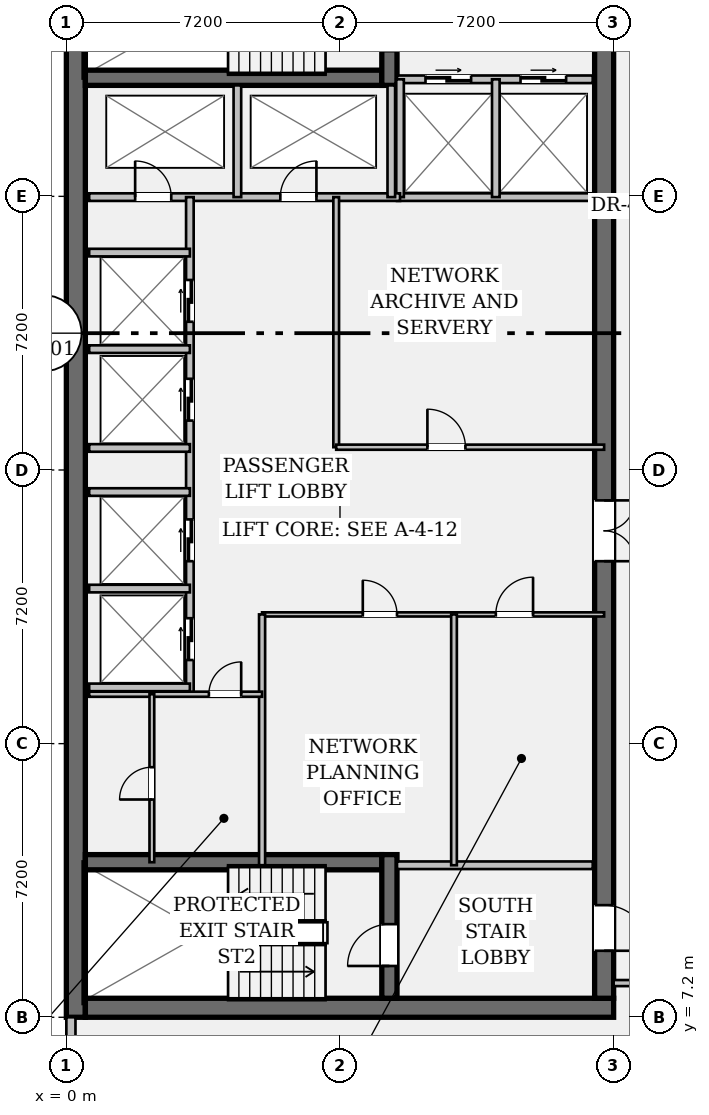
"""IFC4 building model, lengths in metres.
Left out: names, types, materials, properties, quantities, classifications, styles, units other than length and angle.
Written with IfcOpenShell. Run it as: python <this file> out.ifc"""

import sys

from ifc_helpers import new_model, si_unit, direction, frame, frame_2d, origin, place, context, subcontext, project, spatial, rectangle, extrude, element, fill, save


model = new_model("IFC4")
c1 = context("Model", 3, precision=1e-05, world=origin(), true_north=direction((0.0, 1.0)))
c2 = subcontext(c1, "Body", "Model", "MODEL_VIEW")
j1 = project(units=[si_unit("LENGTHUNIT", "METRE"), si_unit("PLANEANGLEUNIT", "RADIAN")], contexts=[c1])
p1 = place(None, origin())
s1 = spatial("IfcSite", under=j1, at=p1, CompositionType="ELEMENT")
p2 = place(p1, origin())
s2 = spatial("IfcBuilding", under=s1, at=p2, CompositionType="ELEMENT")
p3 = place(p2, frame((0.0, 0.0, 176.75)))
s3 = spatial("IfcBuildingStorey", under=s2, at=p3, CompositionType="ELEMENT", Elevation=176.75)
p4 = place(p3, frame((0.25, 7.2, 0.0), z_axis=(0.0, 0.0, 1.0), x_axis=(0.0, 1.0, 0.0)))
e1 = element("IfcWall", 1, at=p4, inside=s3, PredefinedType="SHEAR", context=c2, shape_type="SweptSolid", body=[
    extrude(rectangle(XDim=28.8, YDim=0.5, at=frame_2d((14.4, 0.0))), origin(), (0.0, 0.0, 1.0), 3.24),
])
p5 = place(p3, frame((0.5, 7.45, 0.0), z_axis=(0.0, 0.0, 1.0), x_axis=(1.0, 0.0, 0.0)))
e2 = element("IfcWall", 2, at=p5, inside=s3, PredefinedType="SHEAR", context=c2, shape_type="SweptSolid", body=[
    extrude(rectangle(XDim=13.9, YDim=0.5, at=frame_2d((6.95, 0.0))), origin(), (0.0, 0.0, 1.0), 3.24),
])
p6 = place(p3, frame((14.15, 35.5, 0.0), z_axis=(0.0, 0.0, 1.0), x_axis=(0.0, -1.0, 0.0)))
e3 = element("IfcWall", 3, at=p6, inside=s3, PredefinedType="SHEAR", context=c2, shape_type="SweptSolid", body=[
    extrude(rectangle(XDim=27.8, YDim=0.5, at=frame_2d((13.9, 0.0))), origin(), (0.0, 0.0, 1.0), 3.24),
])
p7 = place(p6, frame((1.4, 0.0, 0.0)))
e4 = element("IfcOpeningElement", 4, at=p7, cuts=e3, PredefinedType="OPENING", context=c2, shape_type="SweptSolid", body=[
    extrude(rectangle(XDim=1.2, YDim=2.15, at=frame_2d((0.6, 1.075))), frame((0.0, 0.262, 0.0), z_axis=(0.0, -1.0, 0.0), x_axis=(1.0, 0.0, 0.0)), (0.0, 0.0, 1.0), 0.524),
])
p8 = place(p6, frame((25.35, 0.0, 0.0)))
e5 = element("IfcOpeningElement", 5, at=p8, cuts=e3, PredefinedType="OPENING", context=c2, shape_type="SweptSolid", body=[
    extrude(rectangle(XDim=1.2, YDim=2.15, at=frame_2d((0.6, 1.075))), frame((0.0, 0.262, 0.0), z_axis=(0.0, -1.0, 0.0), x_axis=(1.0, 0.0, 0.0)), (0.0, 0.0, 1.0), 0.524),
])
p9 = place(p6, frame((14.7, 0.0, 0.0)))
e6 = element("IfcOpeningElement", 6, at=p9, cuts=e3, PredefinedType="OPENING", context=c2, shape_type="SweptSolid", body=[
    extrude(rectangle(XDim=1.6, YDim=2.2, at=frame_2d((0.8, 1.1))), frame((0.0, 0.262, 0.0), z_axis=(0.0, -1.0, 0.0), x_axis=(1.0, 0.0, 0.0)), (0.0, 0.0, 1.0), 0.524),
])
for number, where, z_axis, x_axis in (
    (7, (0.5, 31.92, 0.0), (0.0, 0.0, 1.0), (1.0, 0.0, 0.0)),
    (8, (0.5, 11.28, 0.0), (0.0, 0.0, 1.0), (1.0, 0.0, 0.0)),
):
    element("IfcWall", number, at=place(p3, frame(where, z_axis=z_axis, x_axis=x_axis)), inside=s3, PredefinedType="SHEAR", context=c2, shape_type="SweptSolid", body=[
        extrude(rectangle(XDim=7.8, YDim=0.4, at=frame_2d((3.9, 0.0))), origin(), (0.0, 0.0, 1.0), 3.24),
    ])
p10 = place(p3, frame((8.5, 31.72, 0.0), z_axis=(0.0, 0.0, 1.0), x_axis=(0.0, 1.0, 0.0)))
e9 = element("IfcWall", 9, at=p10, inside=s3, PredefinedType="SHEAR", context=c2, shape_type="SweptSolid", body=[
    extrude(rectangle(XDim=3.78, YDim=0.4, at=frame_2d((1.89, 0.0))), origin(), (0.0, 0.0, 1.0), 3.24),
])
p11 = place(p10, frame((0.9, 0.0, 0.0)))
e10 = element("IfcOpeningElement", 10, at=p11, cuts=e9, PredefinedType="OPENING", context=c2, shape_type="SweptSolid", body=[
    extrude(rectangle(XDim=1.1, YDim=2.15, at=frame_2d((0.55, 1.075))), frame((0.0, 0.212, 0.0), z_axis=(0.0, -1.0, 0.0), x_axis=(1.0, 0.0, 0.0)), (0.0, 0.0, 1.0), 0.424),
])
p12 = place(p3, frame((8.5, 7.7, 0.0), z_axis=(0.0, 0.0, 1.0), x_axis=(0.0, 1.0, 0.0)))
e11 = element("IfcWall", 11, at=p12, inside=s3, PredefinedType="SHEAR", context=c2, shape_type="SweptSolid", body=[
    extrude(rectangle(XDim=3.78, YDim=0.4, at=frame_2d((1.89, 0.0))), origin(), (0.0, 0.0, 1.0), 3.24),
])
p13 = place(p12, frame((0.85, 0.0, 0.0)))
e12 = element("IfcOpeningElement", 12, at=p13, cuts=e11, PredefinedType="OPENING", context=c2, shape_type="SweptSolid", body=[
    extrude(rectangle(XDim=1.1, YDim=2.15, at=frame_2d((0.55, 1.075))), frame((0.0, 0.212, 0.0), z_axis=(0.0, -1.0, 0.0), x_axis=(1.0, 0.0, 0.0)), (0.0, 0.0, 1.0), 0.424),
])
p14 = place(p3, frame((0.12, 6.07, 0.0), z_axis=(0.0, 0.0, 1.0), x_axis=(0.0, 1.0, 0.0)))
e13 = element("IfcWall", 13, at=p14, inside=s3, PredefinedType="STANDARD", context=c2, shape_type="SweptSolid", body=[
    extrude(rectangle(XDim=1.13, YDim=0.24, at=frame_2d((0.565, 0.0))), origin(), (0.0, 0.0, 1.0), 3.24),
])
p15 = place(p3, frame((8.7, 31.88, 0.0), z_axis=(0.0, 0.0, 1.0), x_axis=(1.0, 0.0, 0.0)))
e14 = element("IfcWall", 14, at=p15, inside=s3, PredefinedType="PARTITIONING", context=c2, shape_type="SweptSolid", body=[
    extrude(rectangle(XDim=5.15, YDim=0.2, at=frame_2d((2.575, 0.0))), origin(), (0.0, 0.0, 1.0), 3.24),
])
p16 = place(p15, frame((0.75, 0.0, 0.0)))
e15 = element("IfcOpeningElement", 15, at=p16, cuts=e14, PredefinedType="OPENING", context=c2, shape_type="SweptSolid", body=[
    extrude(rectangle(XDim=1.2, YDim=2.2, at=frame_2d((0.6, 1.1))), frame((0.0, 0.112, 0.0), z_axis=(0.0, -1.0, 0.0), x_axis=(1.0, 0.0, 0.0)), (0.0, 0.0, 1.0), 0.224),
])
p17 = place(p15, frame((3.25, 0.0, 0.0)))
e16 = element("IfcOpeningElement", 16, at=p17, cuts=e14, PredefinedType="OPENING", context=c2, shape_type="SweptSolid", body=[
    extrude(rectangle(XDim=1.2, YDim=2.2, at=frame_2d((0.6, 1.1))), frame((0.0, 0.112, 0.0), z_axis=(0.0, -1.0, 0.0), x_axis=(1.0, 0.0, 0.0)), (0.0, 0.0, 1.0), 0.224),
])
for number, where, z_axis, x_axis in (
    (17, (8.7, 11.2, 0.0), (0.0, 0.0, 1.0), (1.0, 0.0, 0.0)),
    (18, (8.7, 28.78, 0.0), (0.0, 0.0, 1.0), (1.0, 0.0, 0.0)),
):
    element("IfcWall", number, at=place(p3, frame(where, z_axis=z_axis, x_axis=x_axis)), inside=s3, PredefinedType="PARTITIONING", context=c2, shape_type="SweptSolid", body=[
        extrude(rectangle(XDim=5.15, YDim=0.2, at=frame_2d((2.575, 0.0))), origin(), (0.0, 0.0, 1.0), 3.24),
    ])
for number, where, z_axis, x_axis in (
    (19, (8.78, 28.78, 0.0), (0.0, 0.0, 1.0), (0.0, 1.0, 0.0)),
    (20, (11.3, 28.78, 0.0), (0.0, 0.0, 1.0), (0.0, 1.0, 0.0)),
):
    element("IfcWall", number, at=place(p3, frame(where, z_axis=z_axis, x_axis=x_axis)), inside=s3, PredefinedType="PARTITIONING", context=c2, shape_type="SweptSolid", body=[
        extrude(rectangle(XDim=3.1, YDim=0.2, at=frame_2d((1.55, 0.0))), origin(), (0.0, 0.0, 1.0), 3.24),
    ])
p18 = place(p3, frame((0.6, 28.78, 0.0), z_axis=(0.0, 0.0, 1.0), x_axis=(1.0, 0.0, 0.0)))
e21 = element("IfcWall", 21, at=p18, inside=s3, PredefinedType="PARTITIONING", context=c2, shape_type="SweptSolid", body=[
    extrude(rectangle(XDim=8.18, YDim=0.2, at=frame_2d((4.09, 0.0))), origin(), (0.0, 0.0, 1.0), 3.24),
])
p19 = place(p18, frame((1.21, 0.0, 0.0)))
e22 = element("IfcOpeningElement", 22, at=p19, cuts=e21, PredefinedType="OPENING", context=c2, shape_type="SweptSolid", body=[
    extrude(rectangle(XDim=0.95, YDim=2.15, at=frame_2d((0.475, 1.075))), frame((0.0, 0.112, 0.0), z_axis=(0.0, -1.0, 0.0), x_axis=(1.0, 0.0, 0.0)), (0.0, 0.0, 1.0), 0.224),
])
p20 = place(p18, frame((5.03, 0.0, 0.0)))
e23 = element("IfcOpeningElement", 23, at=p20, cuts=e21, PredefinedType="OPENING", context=c2, shape_type="SweptSolid", body=[
    extrude(rectangle(XDim=0.95, YDim=2.15, at=frame_2d((0.475, 1.075))), frame((0.0, 0.112, 0.0), z_axis=(0.0, -1.0, 0.0), x_axis=(1.0, 0.0, 0.0)), (0.0, 0.0, 1.0), 0.224),
])
for number, where, z_axis, x_axis in (
    (24, (4.5, 28.78, 0.0), (0.0, 0.0, 1.0), (0.0, 1.0, 0.0)),
    (25, (8.55, 28.78, 0.0), (0.0, 0.0, 1.0), (0.0, 1.0, 0.0)),
):
    element("IfcWall", number, at=place(p3, frame(where, z_axis=z_axis, x_axis=x_axis)), inside=s3, PredefinedType="PARTITIONING", context=c2, shape_type="SweptSolid", body=[
        extrude(rectangle(XDim=2.94, YDim=0.2, at=frame_2d((1.47, 0.0))), origin(), (0.0, 0.0, 1.0), 3.24),
    ])
p21 = place(p3, frame((3.25, 15.7, 0.0), z_axis=(0.0, 0.0, 1.0), x_axis=(0.0, 1.0, 0.0)))
e26 = element("IfcWall", 26, at=p21, inside=s3, PredefinedType="PARTITIONING", context=c2, shape_type="SweptSolid", body=[
    extrude(rectangle(XDim=13.08, YDim=0.2, at=frame_2d((6.54, 0.0))), origin(), (0.0, 0.0, 1.0), 3.24),
])
p22 = place(p21, frame((0.9, 0.0, 0.0)))
e27 = element("IfcOpeningElement", 27, at=p22, cuts=e26, PredefinedType="OPENING", context=c2, shape_type="SweptSolid", body=[
    extrude(rectangle(XDim=1.1, YDim=2.2, at=frame_2d((0.55, 1.1))), frame((0.0, 0.112, 0.0), z_axis=(0.0, -1.0, 0.0), x_axis=(1.0, 0.0, 0.0)), (0.0, 0.0, 1.0), 0.224),
])
p23 = place(p21, frame((3.5, 0.0, 0.0)))
e28 = element("IfcOpeningElement", 28, at=p23, cuts=e26, PredefinedType="OPENING", context=c2, shape_type="SweptSolid", body=[
    extrude(rectangle(XDim=1.1, YDim=2.2, at=frame_2d((0.55, 1.1))), frame((0.0, 0.112, 0.0), z_axis=(0.0, -1.0, 0.0), x_axis=(1.0, 0.0, 0.0)), (0.0, 0.0, 1.0), 0.224),
])
p24 = place(p21, frame((7.2, 0.0, 0.0)))
e29 = element("IfcOpeningElement", 29, at=p24, cuts=e26, PredefinedType="OPENING", context=c2, shape_type="SweptSolid", body=[
    extrude(rectangle(XDim=1.1, YDim=2.2, at=frame_2d((0.55, 1.1))), frame((0.0, 0.112, 0.0), z_axis=(0.0, -1.0, 0.0), x_axis=(1.0, 0.0, 0.0)), (0.0, 0.0, 1.0), 0.224),
])
p25 = place(p21, frame((9.8, 0.0, 0.0)))
e30 = element("IfcOpeningElement", 30, at=p25, cuts=e26, PredefinedType="OPENING", context=c2, shape_type="SweptSolid", body=[
    extrude(rectangle(XDim=1.1, YDim=2.2, at=frame_2d((0.55, 1.1))), frame((0.0, 0.112, 0.0), z_axis=(0.0, -1.0, 0.0), x_axis=(1.0, 0.0, 0.0)), (0.0, 0.0, 1.0), 0.224),
])
for number, where, z_axis, x_axis in (
    (31, (0.6, 15.88, 0.0), (0.0, 0.0, 1.0), (1.0, 0.0, 0.0)),
    (32, (0.6, 18.48, 0.0), (0.0, 0.0, 1.0), (1.0, 0.0, 0.0)),
    (33, (0.6, 22.18, 0.0), (0.0, 0.0, 1.0), (1.0, 0.0, 0.0)),
    (34, (0.6, 24.78, 0.0), (0.0, 0.0, 1.0), (1.0, 0.0, 0.0)),
    (35, (0.6, 21.02, 0.0), (0.0, 0.0, 1.0), (1.0, 0.0, 0.0)),
    (36, (0.6, 27.32, 0.0), (0.0, 0.0, 1.0), (1.0, 0.0, 0.0)),
):
    element("IfcWall", number, at=place(p3, frame(where, z_axis=z_axis, x_axis=x_axis)), inside=s3, PredefinedType="PARTITIONING", context=c2, shape_type="SweptSolid", body=[
        extrude(rectangle(XDim=2.65, YDim=0.2, at=frame_2d((1.325, 0.0))), origin(), (0.0, 0.0, 1.0), 3.24),
    ])
p26 = place(p3, frame((7.1, 22.2, 0.0), z_axis=(0.0, 0.0, 1.0), x_axis=(0.0, 1.0, 0.0)))
e37 = element("IfcWall", 37, at=p26, inside=s3, PredefinedType="PARTITIONING", context=c2, shape_type="SweptSolid", body=[
    extrude(rectangle(XDim=6.58, YDim=0.15, at=frame_2d((3.29, 0.0))), origin(), (0.0, 0.0, 1.0), 3.24),
])
p27 = place(p3, frame((7.1, 22.2, 0.0), z_axis=(0.0, 0.0, 1.0), x_axis=(1.0, 0.0, 0.0)))
e38 = element("IfcWall", 38, at=p27, inside=s3, PredefinedType="PARTITIONING", context=c2, shape_type="SweptSolid", body=[
    extrude(rectangle(XDim=7.05, YDim=0.135, at=frame_2d((3.525, 0.0))), origin(), (0.0, 0.0, 1.0), 3.24),
])
p28 = place(p27, frame((2.4, 0.0, 0.0)))
e39 = element("IfcOpeningElement", 39, at=p28, cuts=e38, PredefinedType="OPENING", context=c2, shape_type="SweptSolid", body=[
    extrude(rectangle(XDim=1.0, YDim=2.15, at=frame_2d((0.5, 1.075))), frame((0.0, 0.08, 0.0), z_axis=(0.0, -1.0, 0.0), x_axis=(1.0, 0.0, 0.0)), (0.0, 0.0, 1.0), 0.159),
])
p29 = place(p3, frame((5.15, 17.8, 0.0), z_axis=(0.0, 0.0, 1.0), x_axis=(1.0, 0.0, 0.0)))
e40 = element("IfcWall", 40, at=p29, inside=s3, PredefinedType="PARTITIONING", context=c2, shape_type="SweptSolid", body=[
    extrude(rectangle(XDim=9.0, YDim=0.11, at=frame_2d((4.5, 0.0))), origin(), (0.0, 0.0, 1.0), 3.24),
])
p30 = place(p29, frame((2.65, 0.0, 0.0)))
e41 = element("IfcOpeningElement", 41, at=p30, cuts=e40, PredefinedType="OPENING", context=c2, shape_type="SweptSolid", body=[
    extrude(rectangle(XDim=0.9, YDim=2.15, at=frame_2d((0.45, 1.075))), frame((0.0, 0.067, 0.0), z_axis=(0.0, -1.0, 0.0), x_axis=(1.0, 0.0, 0.0)), (0.0, 0.0, 1.0), 0.134),
])
p31 = place(p29, frame((6.15, 0.0, 0.0)))
e42 = element("IfcOpeningElement", 42, at=p31, cuts=e40, PredefinedType="OPENING", context=c2, shape_type="SweptSolid", body=[
    extrude(rectangle(XDim=0.98, YDim=2.15, at=frame_2d((0.49, 1.075))), frame((0.0, 0.067, 0.0), z_axis=(0.0, -1.0, 0.0), x_axis=(1.0, 0.0, 0.0)), (0.0, 0.0, 1.0), 0.134),
])
p32 = place(p3, frame((5.15, 11.2, 0.0), z_axis=(0.0, 0.0, 1.0), x_axis=(0.0, 1.0, 0.0)))
e43 = element("IfcWall", 43, at=p32, inside=s3, PredefinedType="PARTITIONING", context=c2, shape_type="SweptSolid", body=[
    extrude(rectangle(XDim=6.6, YDim=0.16, at=frame_2d((3.3, 0.0))), origin(), (0.0, 0.0, 1.0), 3.24),
])
p33 = place(p3, frame((10.2, 11.2, 0.0), z_axis=(0.0, 0.0, 1.0), x_axis=(0.0, 1.0, 0.0)))
e44 = element("IfcWall", 44, at=p33, inside=s3, PredefinedType="PARTITIONING", context=c2, shape_type="SweptSolid", body=[
    extrude(rectangle(XDim=6.6, YDim=0.15, at=frame_2d((3.3, 0.0))), origin(), (0.0, 0.0, 1.0), 3.24),
])
p34 = place(p3, frame((0.6, 15.7, 0.0), z_axis=(0.0, 0.0, 1.0), x_axis=(1.0, 0.0, 0.0)))
e45 = element("IfcWall", 45, at=p34, inside=s3, PredefinedType="PARTITIONING", context=c2, shape_type="SweptSolid", body=[
    extrude(rectangle(XDim=4.55, YDim=0.135, at=frame_2d((2.275, 0.0))), origin(), (0.0, 0.0, 1.0), 3.24),
])
p35 = place(p34, frame((3.15, 0.0, 0.0)))
e46 = element("IfcOpeningElement", 46, at=p35, cuts=e45, PredefinedType="OPENING", context=c2, shape_type="SweptSolid", body=[
    extrude(rectangle(XDim=0.85, YDim=2.15, at=frame_2d((0.425, 1.075))), frame((0.0, 0.08, 0.0), z_axis=(0.0, -1.0, 0.0), x_axis=(1.0, 0.0, 0.0)), (0.0, 0.0, 1.0), 0.159),
])
p36 = place(p3, frame((2.25, 11.28, 0.0), z_axis=(0.0, 0.0, 1.0), x_axis=(0.0, 1.0, 0.0)))
e47 = element("IfcWall", 47, at=p36, inside=s3, PredefinedType="PARTITIONING", context=c2, shape_type="SweptSolid", body=[
    extrude(rectangle(XDim=4.42, YDim=0.125, at=frame_2d((2.21, 0.0))), origin(), (0.0, 0.0, 1.0), 3.24),
])
p37 = place(p36, frame((1.65, 0.0, 0.0)))
e48 = element("IfcOpeningElement", 48, at=p37, cuts=e47, PredefinedType="OPENING", context=c2, shape_type="SweptSolid", body=[
    extrude(rectangle(XDim=0.85, YDim=2.15, at=frame_2d((0.425, 1.075))), frame((0.0, 0.074, 0.0), z_axis=(0.0, -1.0, 0.0), x_axis=(1.0, 0.0, 0.0)), (0.0, 0.0, 1.0), 0.149),
])
p38 = place(p3, frame((14.4, 8.1, 0.0), z_axis=(0.0, 0.0, 1.0), x_axis=(1.0, 0.0, 0.0)))
e49 = element("IfcWall", 49, at=p38, inside=s3, PredefinedType="PARTITIONING", context=c2, shape_type="SweptSolid", body=[
    extrude(rectangle(XDim=2.95, YDim=0.16, at=frame_2d((1.475, 0.0))), origin(), (0.0, 0.0, 1.0), 2.808),
])
p39 = place(p38, frame((0.95, 0.0, 0.0)))
e50 = element("IfcOpeningElement", 50, at=p39, cuts=e49, PredefinedType="OPENING", context=c2, shape_type="SweptSolid", body=[
    extrude(rectangle(XDim=0.98, YDim=2.15, at=frame_2d((0.49, 1.075))), frame((0.0, 0.092, 0.0), z_axis=(0.0, -1.0, 0.0), x_axis=(1.0, 0.0, 0.0)), (0.0, 0.0, 1.0), 0.184),
])
p40 = place(p13, origin())
e51 = element("IfcDoor", 51, at=p40, inside=s3, OperationType="SINGLE_SWING_LEFT", PredefinedType="DOOR", context=c2, shape_type="SweptSolid", body=[
    extrude(rectangle(XDim=1.1, YDim=2.15, at=frame_2d((0.55, 1.075))), frame((0.0, 0.025, 0.0), z_axis=(0.0, -1.0, 0.0), x_axis=(1.0, 0.0, 0.0)), (0.0, 0.0, 1.0), 0.05),
])
fill(e12, e51)
p41 = place(p8, origin())
e52 = element("IfcDoor", 52, at=p41, inside=s3, OperationType="SINGLE_SWING_RIGHT", PredefinedType="DOOR", context=c2, shape_type="SweptSolid", body=[
    extrude(rectangle(XDim=1.2, YDim=2.15, at=frame_2d((0.6, 1.075))), frame((0.0, 0.025, 0.0), z_axis=(0.0, -1.0, 0.0), x_axis=(1.0, 0.0, 0.0)), (0.0, 0.0, 1.0), 0.05),
])
fill(e5, e52)
p42 = place(p16, origin())
e53 = element("IfcDoor", 53, at=p42, inside=s3, OperationType="DOUBLE_DOOR_SLIDING", PredefinedType="DOOR", context=c2, shape_type="SweptSolid", body=[
    extrude(rectangle(XDim=1.2, YDim=2.2, at=frame_2d((0.6, 1.1))), frame((0.0, 0.025, 0.0), z_axis=(0.0, -1.0, 0.0), x_axis=(1.0, 0.0, 0.0)), (0.0, 0.0, 1.0), 0.05),
])
fill(e15, e53)
p43 = place(p17, origin())
e54 = element("IfcDoor", 54, at=p43, inside=s3, OperationType="DOUBLE_DOOR_SLIDING", PredefinedType="DOOR", context=c2, shape_type="SweptSolid", body=[
    extrude(rectangle(XDim=1.2, YDim=2.2, at=frame_2d((0.6, 1.1))), frame((0.0, 0.025, 0.0), z_axis=(0.0, -1.0, 0.0), x_axis=(1.0, 0.0, 0.0)), (0.0, 0.0, 1.0), 0.05),
])
fill(e16, e54)
p44 = place(p19, origin())
e55 = element("IfcDoor", 55, at=p44, inside=s3, OperationType="SINGLE_SWING_LEFT", PredefinedType="DOOR", context=c2, shape_type="SweptSolid", body=[
    extrude(rectangle(XDim=0.95, YDim=2.15, at=frame_2d((0.475, 1.075))), frame((0.0, 0.025, 0.0), z_axis=(0.0, -1.0, 0.0), x_axis=(1.0, 0.0, 0.0)), (0.0, 0.0, 1.0), 0.05),
])
fill(e22, e55)
p45 = place(p20, origin())
e56 = element("IfcDoor", 56, at=p45, inside=s3, OperationType="SINGLE_SWING_RIGHT", PredefinedType="DOOR", context=c2, shape_type="SweptSolid", body=[
    extrude(rectangle(XDim=0.95, YDim=2.15, at=frame_2d((0.475, 1.075))), frame((0.0, 0.025, 0.0), z_axis=(0.0, -1.0, 0.0), x_axis=(1.0, 0.0, 0.0)), (0.0, 0.0, 1.0), 0.05),
])
fill(e23, e56)
p46 = place(p9, origin())
e57 = element("IfcDoor", 57, at=p46, inside=s3, OperationType="DOUBLE_DOOR_SINGLE_SWING", PredefinedType="DOOR", context=c2, shape_type="SweptSolid", body=[
    extrude(rectangle(XDim=1.6, YDim=2.2, at=frame_2d((0.8, 1.1))), frame((0.0, 0.025, 0.0), z_axis=(0.0, -1.0, 0.0), x_axis=(1.0, 0.0, 0.0)), (0.0, 0.0, 1.0), 0.05),
])
fill(e6, e57)
p47 = place(p22, origin())
e58 = element("IfcDoor", 58, at=p47, inside=s3, OperationType="DOUBLE_DOOR_SLIDING", PredefinedType="DOOR", context=c2, shape_type="SweptSolid", body=[
    extrude(rectangle(XDim=1.1, YDim=2.2, at=frame_2d((0.55, 1.1))), frame((0.0, 0.025, 0.0), z_axis=(0.0, -1.0, 0.0), x_axis=(1.0, 0.0, 0.0)), (0.0, 0.0, 1.0), 0.05),
])
fill(e27, e58)
p48 = place(p23, origin())
e59 = element("IfcDoor", 59, at=p48, inside=s3, OperationType="DOUBLE_DOOR_SLIDING", PredefinedType="DOOR", context=c2, shape_type="SweptSolid", body=[
    extrude(rectangle(XDim=1.1, YDim=2.2, at=frame_2d((0.55, 1.1))), frame((0.0, 0.025, 0.0), z_axis=(0.0, -1.0, 0.0), x_axis=(1.0, 0.0, 0.0)), (0.0, 0.0, 1.0), 0.05),
])
fill(e28, e59)
p49 = place(p24, origin())
e60 = element("IfcDoor", 60, at=p49, inside=s3, OperationType="DOUBLE_DOOR_SLIDING", PredefinedType="DOOR", context=c2, shape_type="SweptSolid", body=[
    extrude(rectangle(XDim=1.1, YDim=2.2, at=frame_2d((0.55, 1.1))), frame((0.0, 0.025, 0.0), z_axis=(0.0, -1.0, 0.0), x_axis=(1.0, 0.0, 0.0)), (0.0, 0.0, 1.0), 0.05),
])
fill(e29, e60)
p50 = place(p25, origin())
e61 = element("IfcDoor", 61, at=p50, inside=s3, OperationType="DOUBLE_DOOR_SLIDING", PredefinedType="DOOR", context=c2, shape_type="SweptSolid", body=[
    extrude(rectangle(XDim=1.1, YDim=2.2, at=frame_2d((0.55, 1.1))), frame((0.0, 0.025, 0.0), z_axis=(0.0, -1.0, 0.0), x_axis=(1.0, 0.0, 0.0)), (0.0, 0.0, 1.0), 0.05),
])
fill(e30, e61)
p51 = place(p28, origin())
e62 = element("IfcDoor", 62, at=p51, inside=s3, OperationType="SINGLE_SWING_LEFT", PredefinedType="DOOR", context=c2, shape_type="SweptSolid", body=[
    extrude(rectangle(XDim=1.0, YDim=2.15, at=frame_2d((0.5, 1.075))), frame((0.0, 0.025, 0.0), z_axis=(0.0, -1.0, 0.0), x_axis=(1.0, 0.0, 0.0)), (0.0, 0.0, 1.0), 0.05),
])
fill(e39, e62)
p52 = place(p30, origin())
e63 = element("IfcDoor", 63, at=p52, inside=s3, OperationType="SINGLE_SWING_LEFT", PredefinedType="DOOR", context=c2, shape_type="SweptSolid", body=[
    extrude(rectangle(XDim=0.9, YDim=2.15, at=frame_2d((0.45, 1.075))), frame((0.0, 0.025, 0.0), z_axis=(0.0, -1.0, 0.0), x_axis=(1.0, 0.0, 0.0)), (0.0, 0.0, 1.0), 0.05),
])
fill(e41, e63)
p53 = place(p31, origin())
e64 = element("IfcDoor", 64, at=p53, inside=s3, OperationType="SINGLE_SWING_RIGHT", PredefinedType="DOOR", context=c2, shape_type="SweptSolid", body=[
    extrude(rectangle(XDim=0.98, YDim=2.15, at=frame_2d((0.49, 1.075))), frame((0.0, 0.025, 0.0), z_axis=(0.0, -1.0, 0.0), x_axis=(1.0, 0.0, 0.0)), (0.0, 0.0, 1.0), 0.05),
])
fill(e42, e64)
p54 = place(p35, origin())
e65 = element("IfcDoor", 65, at=p54, inside=s3, OperationType="SINGLE_SWING_RIGHT", PredefinedType="DOOR", context=c2, shape_type="SweptSolid", body=[
    extrude(rectangle(XDim=0.85, YDim=2.15, at=frame_2d((0.425, 1.075))), frame((0.0, 0.025, 0.0), z_axis=(0.0, -1.0, 0.0), x_axis=(1.0, 0.0, 0.0)), (0.0, 0.0, 1.0), 0.05),
])
fill(e46, e65)
p55 = place(p37, origin())
e66 = element("IfcDoor", 66, at=p55, inside=s3, OperationType="SINGLE_SWING_LEFT", PredefinedType="DOOR", context=c2, shape_type="SweptSolid", body=[
    extrude(rectangle(XDim=0.85, YDim=2.15, at=frame_2d((0.425, 1.075))), frame((0.0, 0.025, 0.0), z_axis=(0.0, -1.0, 0.0), x_axis=(1.0, 0.0, 0.0)), (0.0, 0.0, 1.0), 0.05),
])
fill(e48, e66)
save(model, sys.argv[1])
